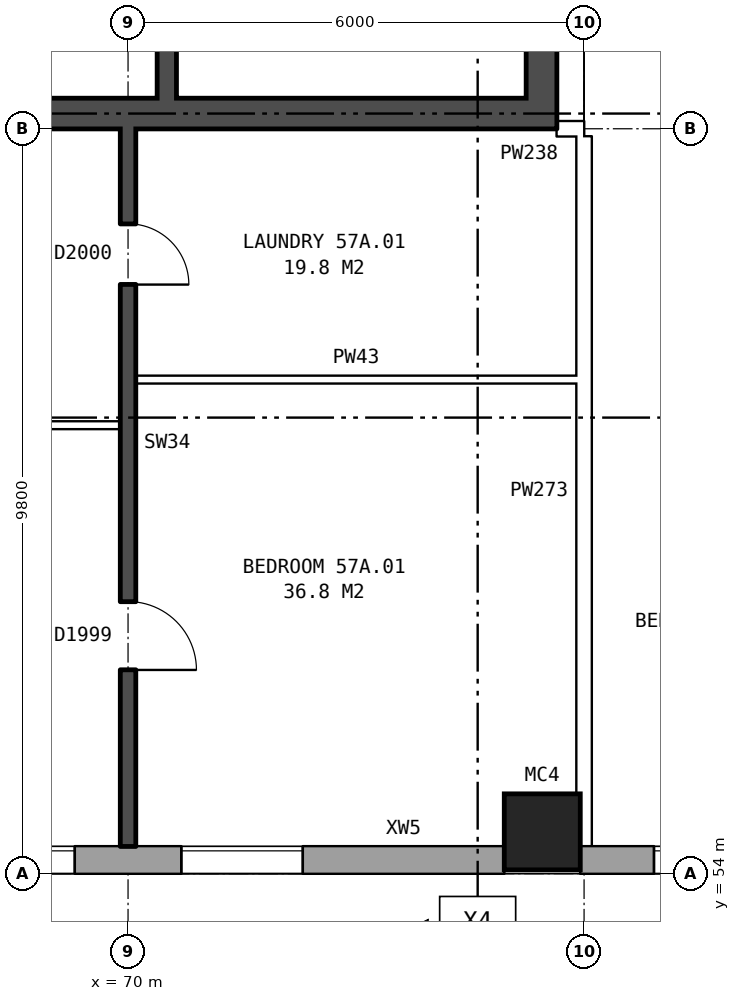
"""IFC4 building model, lengths in metres.
Left out: names, types, materials, properties, quantities, classifications, styles, units other than length and angle.
Written with IfcOpenShell. Run it as: python <this file> out.ifc"""

import sys

from ifc_helpers import new_model, si_unit, direction, frame, frame_2d, origin, origin_2d, place, context, subcontext, project, spatial, rectangle, hollow_rectangle, extrude, element, fill, save


model = new_model("IFC4")
c1 = context("Model", 3, precision=1e-05, world=origin(), true_north=direction((0.0, 1.0)))
c2 = subcontext(c1, "Body", "Model", "MODEL_VIEW")
j1 = project(units=[si_unit("LENGTHUNIT", "METRE"), si_unit("PLANEANGLEUNIT", "RADIAN")], contexts=[c1])
p1 = place(None, origin())
s1 = spatial("IfcSite", under=j1, at=p1, CompositionType="ELEMENT")
p2 = place(p1, origin())
s2 = spatial("IfcBuilding", under=s1, at=p2, CompositionType="ELEMENT")
p3 = place(p2, frame((0.0, 0.0, 202.8)))
s3 = spatial("IfcBuildingStorey", under=s2, at=p3, CompositionType="ELEMENT", Elevation=202.8)
p4 = place(p3, frame((75.45, 54.55, 0.0), z_axis=(0.0, 0.0, 1.0), x_axis=(1.0, 0.0, 0.0)))
e1 = element("IfcColumn", 1, at=p4, inside=s3, PredefinedType="COLUMN", context=c2, shape_type="SweptSolid", body=[
    extrude(hollow_rectangle(XDim=1.0, YDim=1.0, WallThickness=0.055, at=origin_2d()), origin(), (0.0, 0.0, 1.0), 3.1),
])
p5 = place(p3, frame((35.075, 54.18, 0.0), z_axis=(0.0, 0.0, 1.0), x_axis=(1.0, 0.0, 0.0)))
e2 = element("IfcWall", 2, at=p5, inside=s3, PredefinedType="STANDARD", context=c2, shape_type="SweptSolid", body=[
    extrude(rectangle(XDim=39.875, YDim=0.36, at=frame_2d((19.938, 0.0))), origin(), (0.0, 0.0, 1.0), 2.85),
])
p6 = place(p5, frame((2.625, 0.0, 0.8)))
e3 = element("IfcOpeningElement", 3, at=p6, cuts=e2, PredefinedType="OPENING", context=c2, shape_type="SweptSolid", body=[
    extrude(rectangle(XDim=1.6, YDim=1.8, at=frame_2d((0.8, 0.9))), frame((0.0, 0.19, 0.0), z_axis=(0.0, -1.0, 0.0), x_axis=(1.0, 0.0, 0.0)), (0.0, 0.0, 1.0), 0.38),
])
p7 = place(p5, frame((5.625, 0.0, 0.8)))
e4 = element("IfcOpeningElement", 4, at=p7, cuts=e2, PredefinedType="OPENING", context=c2, shape_type="SweptSolid", body=[
    extrude(rectangle(XDim=1.6, YDim=1.8, at=frame_2d((0.8, 0.9))), frame((0.0, 0.19, 0.0), z_axis=(0.0, -1.0, 0.0), x_axis=(1.0, 0.0, 0.0)), (0.0, 0.0, 1.0), 0.38),
])
p8 = place(p5, frame((8.625, 0.0, 0.8)))
e5 = element("IfcOpeningElement", 5, at=p8, cuts=e2, PredefinedType="OPENING", context=c2, shape_type="SweptSolid", body=[
    extrude(rectangle(XDim=1.6, YDim=1.8, at=frame_2d((0.8, 0.9))), frame((0.0, 0.19, 0.0), z_axis=(0.0, -1.0, 0.0), x_axis=(1.0, 0.0, 0.0)), (0.0, 0.0, 1.0), 0.38),
])
p9 = place(p5, frame((11.625, 0.0, 0.8)))
e6 = element("IfcOpeningElement", 6, at=p9, cuts=e2, PredefinedType="OPENING", context=c2, shape_type="SweptSolid", body=[
    extrude(rectangle(XDim=1.6, YDim=1.8, at=frame_2d((0.8, 0.9))), frame((0.0, 0.19, 0.0), z_axis=(0.0, -1.0, 0.0), x_axis=(1.0, 0.0, 0.0)), (0.0, 0.0, 1.0), 0.38),
])
p10 = place(p5, frame((14.625, 0.0, 0.8)))
e7 = element("IfcOpeningElement", 7, at=p10, cuts=e2, PredefinedType="OPENING", context=c2, shape_type="SweptSolid", body=[
    extrude(rectangle(XDim=1.6, YDim=1.8, at=frame_2d((0.8, 0.9))), frame((0.0, 0.19, 0.0), z_axis=(0.0, -1.0, 0.0), x_axis=(1.0, 0.0, 0.0)), (0.0, 0.0, 1.0), 0.38),
])
p11 = place(p5, frame((17.625, 0.0, 0.8)))
e8 = element("IfcOpeningElement", 8, at=p11, cuts=e2, PredefinedType="OPENING", context=c2, shape_type="SweptSolid", body=[
    extrude(rectangle(XDim=1.6, YDim=1.8, at=frame_2d((0.8, 0.9))), frame((0.0, 0.19, 0.0), z_axis=(0.0, -1.0, 0.0), x_axis=(1.0, 0.0, 0.0)), (0.0, 0.0, 1.0), 0.38),
])
p12 = place(p5, frame((20.625, 0.0, 0.8)))
e9 = element("IfcOpeningElement", 9, at=p12, cuts=e2, PredefinedType="OPENING", context=c2, shape_type="SweptSolid", body=[
    extrude(rectangle(XDim=1.6, YDim=1.8, at=frame_2d((0.8, 0.9))), frame((0.0, 0.19, 0.0), z_axis=(0.0, -1.0, 0.0), x_axis=(1.0, 0.0, 0.0)), (0.0, 0.0, 1.0), 0.38),
])
p13 = place(p5, frame((23.625, 0.0, 0.8)))
e10 = element("IfcOpeningElement", 10, at=p13, cuts=e2, PredefinedType="OPENING", context=c2, shape_type="SweptSolid", body=[
    extrude(rectangle(XDim=1.6, YDim=1.8, at=frame_2d((0.8, 0.9))), frame((0.0, 0.19, 0.0), z_axis=(0.0, -1.0, 0.0), x_axis=(1.0, 0.0, 0.0)), (0.0, 0.0, 1.0), 0.38),
])
p14 = place(p5, frame((26.625, 0.0, 0.8)))
e11 = element("IfcOpeningElement", 11, at=p14, cuts=e2, PredefinedType="OPENING", context=c2, shape_type="SweptSolid", body=[
    extrude(rectangle(XDim=1.6, YDim=1.8, at=frame_2d((0.8, 0.9))), frame((0.0, 0.19, 0.0), z_axis=(0.0, -1.0, 0.0), x_axis=(1.0, 0.0, 0.0)), (0.0, 0.0, 1.0), 0.38),
])
p15 = place(p5, frame((29.625, 0.0, 0.8)))
e12 = element("IfcOpeningElement", 12, at=p15, cuts=e2, PredefinedType="OPENING", context=c2, shape_type="SweptSolid", body=[
    extrude(rectangle(XDim=1.6, YDim=1.8, at=frame_2d((0.8, 0.9))), frame((0.0, 0.19, 0.0), z_axis=(0.0, -1.0, 0.0), x_axis=(1.0, 0.0, 0.0)), (0.0, 0.0, 1.0), 0.38),
])
p16 = place(p5, frame((32.625, 0.0, 0.8)))
e13 = element("IfcOpeningElement", 13, at=p16, cuts=e2, PredefinedType="OPENING", context=c2, shape_type="SweptSolid", body=[
    extrude(rectangle(XDim=1.6, YDim=1.8, at=frame_2d((0.8, 0.9))), frame((0.0, 0.19, 0.0), z_axis=(0.0, -1.0, 0.0), x_axis=(1.0, 0.0, 0.0)), (0.0, 0.0, 1.0), 0.38),
])
p17 = place(p5, frame((35.625, 0.0, 0.8)))
e14 = element("IfcOpeningElement", 14, at=p17, cuts=e2, PredefinedType="OPENING", context=c2, shape_type="SweptSolid", body=[
    extrude(rectangle(XDim=1.6, YDim=1.8, at=frame_2d((0.8, 0.9))), frame((0.0, 0.19, 0.0), z_axis=(0.0, -1.0, 0.0), x_axis=(1.0, 0.0, 0.0)), (0.0, 0.0, 1.0), 0.38),
])
p18 = place(p3, frame((75.95, 54.18, 0.0), z_axis=(0.0, 0.0, 1.0), x_axis=(1.0, 0.0, 0.0)))
e15 = element("IfcWall", 15, at=p18, inside=s3, PredefinedType="STANDARD", context=c2, shape_type="SweptSolid", body=[
    extrude(rectangle(XDim=55.1, YDim=0.36, at=frame_2d((27.55, 0.0))), origin(), (0.0, 0.0, 1.0), 2.85),
])
p19 = place(p18, frame((0.969, 0.0, 0.8)))
e16 = element("IfcOpeningElement", 16, at=p19, cuts=e15, PredefinedType="OPENING", context=c2, shape_type="SweptSolid", body=[
    extrude(rectangle(XDim=1.6, YDim=1.8, at=frame_2d((0.8, 0.9))), frame((0.0, 0.19, 0.0), z_axis=(0.0, -1.0, 0.0), x_axis=(1.0, 0.0, 0.0)), (0.0, 0.0, 1.0), 0.38),
])
p20 = place(p18, frame((4.406, 0.0, 0.8)))
e17 = element("IfcOpeningElement", 17, at=p20, cuts=e15, PredefinedType="OPENING", context=c2, shape_type="SweptSolid", body=[
    extrude(rectangle(XDim=1.6, YDim=1.8, at=frame_2d((0.8, 0.9))), frame((0.0, 0.19, 0.0), z_axis=(0.0, -1.0, 0.0), x_axis=(1.0, 0.0, 0.0)), (0.0, 0.0, 1.0), 0.38),
])
p21 = place(p18, frame((7.844, 0.0, 0.8)))
e18 = element("IfcOpeningElement", 18, at=p21, cuts=e15, PredefinedType="OPENING", context=c2, shape_type="SweptSolid", body=[
    extrude(rectangle(XDim=1.6, YDim=1.8, at=frame_2d((0.8, 0.9))), frame((0.0, 0.19, 0.0), z_axis=(0.0, -1.0, 0.0), x_axis=(1.0, 0.0, 0.0)), (0.0, 0.0, 1.0), 0.38),
])
p22 = place(p18, frame((11.281, 0.0, 0.8)))
e19 = element("IfcOpeningElement", 19, at=p22, cuts=e15, PredefinedType="OPENING", context=c2, shape_type="SweptSolid", body=[
    extrude(rectangle(XDim=1.6, YDim=1.8, at=frame_2d((0.8, 0.9))), frame((0.0, 0.19, 0.0), z_axis=(0.0, -1.0, 0.0), x_axis=(1.0, 0.0, 0.0)), (0.0, 0.0, 1.0), 0.38),
])
p23 = place(p18, frame((14.719, 0.0, 0.8)))
e20 = element("IfcOpeningElement", 20, at=p23, cuts=e15, PredefinedType="OPENING", context=c2, shape_type="SweptSolid", body=[
    extrude(rectangle(XDim=1.6, YDim=1.8, at=frame_2d((0.8, 0.9))), frame((0.0, 0.19, 0.0), z_axis=(0.0, -1.0, 0.0), x_axis=(1.0, 0.0, 0.0)), (0.0, 0.0, 1.0), 0.38),
])
p24 = place(p18, frame((18.156, 0.0, 0.8)))
e21 = element("IfcOpeningElement", 21, at=p24, cuts=e15, PredefinedType="OPENING", context=c2, shape_type="SweptSolid", body=[
    extrude(rectangle(XDim=1.6, YDim=1.8, at=frame_2d((0.8, 0.9))), frame((0.0, 0.19, 0.0), z_axis=(0.0, -1.0, 0.0), x_axis=(1.0, 0.0, 0.0)), (0.0, 0.0, 1.0), 0.38),
])
p25 = place(p18, frame((21.594, 0.0, 0.8)))
e22 = element("IfcOpeningElement", 22, at=p25, cuts=e15, PredefinedType="OPENING", context=c2, shape_type="SweptSolid", body=[
    extrude(rectangle(XDim=1.6, YDim=1.8, at=frame_2d((0.8, 0.9))), frame((0.0, 0.19, 0.0), z_axis=(0.0, -1.0, 0.0), x_axis=(1.0, 0.0, 0.0)), (0.0, 0.0, 1.0), 0.38),
])
p26 = place(p18, frame((25.031, 0.0, 0.8)))
e23 = element("IfcOpeningElement", 23, at=p26, cuts=e15, PredefinedType="OPENING", context=c2, shape_type="SweptSolid", body=[
    extrude(rectangle(XDim=1.6, YDim=1.8, at=frame_2d((0.8, 0.9))), frame((0.0, 0.19, 0.0), z_axis=(0.0, -1.0, 0.0), x_axis=(1.0, 0.0, 0.0)), (0.0, 0.0, 1.0), 0.38),
])
p27 = place(p18, frame((28.469, 0.0, 0.8)))
e24 = element("IfcOpeningElement", 24, at=p27, cuts=e15, PredefinedType="OPENING", context=c2, shape_type="SweptSolid", body=[
    extrude(rectangle(XDim=1.6, YDim=1.8, at=frame_2d((0.8, 0.9))), frame((0.0, 0.19, 0.0), z_axis=(0.0, -1.0, 0.0), x_axis=(1.0, 0.0, 0.0)), (0.0, 0.0, 1.0), 0.38),
])
p28 = place(p18, frame((31.906, 0.0, 0.8)))
e25 = element("IfcOpeningElement", 25, at=p28, cuts=e15, PredefinedType="OPENING", context=c2, shape_type="SweptSolid", body=[
    extrude(rectangle(XDim=1.6, YDim=1.8, at=frame_2d((0.8, 0.9))), frame((0.0, 0.19, 0.0), z_axis=(0.0, -1.0, 0.0), x_axis=(1.0, 0.0, 0.0)), (0.0, 0.0, 1.0), 0.38),
])
p29 = place(p18, frame((35.344, 0.0, 0.8)))
e26 = element("IfcOpeningElement", 26, at=p29, cuts=e15, PredefinedType="OPENING", context=c2, shape_type="SweptSolid", body=[
    extrude(rectangle(XDim=1.6, YDim=1.8, at=frame_2d((0.8, 0.9))), frame((0.0, 0.19, 0.0), z_axis=(0.0, -1.0, 0.0), x_axis=(1.0, 0.0, 0.0)), (0.0, 0.0, 1.0), 0.38),
])
p30 = place(p18, frame((38.781, 0.0, 0.8)))
e27 = element("IfcOpeningElement", 27, at=p30, cuts=e15, PredefinedType="OPENING", context=c2, shape_type="SweptSolid", body=[
    extrude(rectangle(XDim=1.6, YDim=1.8, at=frame_2d((0.8, 0.9))), frame((0.0, 0.19, 0.0), z_axis=(0.0, -1.0, 0.0), x_axis=(1.0, 0.0, 0.0)), (0.0, 0.0, 1.0), 0.38),
])
p31 = place(p18, frame((42.219, 0.0, 0.8)))
e28 = element("IfcOpeningElement", 28, at=p31, cuts=e15, PredefinedType="OPENING", context=c2, shape_type="SweptSolid", body=[
    extrude(rectangle(XDim=1.6, YDim=1.8, at=frame_2d((0.8, 0.9))), frame((0.0, 0.19, 0.0), z_axis=(0.0, -1.0, 0.0), x_axis=(1.0, 0.0, 0.0)), (0.0, 0.0, 1.0), 0.38),
])
p32 = place(p18, frame((45.656, 0.0, 0.8)))
e29 = element("IfcOpeningElement", 29, at=p32, cuts=e15, PredefinedType="OPENING", context=c2, shape_type="SweptSolid", body=[
    extrude(rectangle(XDim=1.6, YDim=1.8, at=frame_2d((0.8, 0.9))), frame((0.0, 0.19, 0.0), z_axis=(0.0, -1.0, 0.0), x_axis=(1.0, 0.0, 0.0)), (0.0, 0.0, 1.0), 0.38),
])
p33 = place(p18, frame((49.094, 0.0, 0.8)))
e30 = element("IfcOpeningElement", 30, at=p33, cuts=e15, PredefinedType="OPENING", context=c2, shape_type="SweptSolid", body=[
    extrude(rectangle(XDim=1.6, YDim=1.8, at=frame_2d((0.8, 0.9))), frame((0.0, 0.19, 0.0), z_axis=(0.0, -1.0, 0.0), x_axis=(1.0, 0.0, 0.0)), (0.0, 0.0, 1.0), 0.38),
])
p34 = place(p18, frame((52.531, 0.0, 0.8)))
e31 = element("IfcOpeningElement", 31, at=p34, cuts=e15, PredefinedType="OPENING", context=c2, shape_type="SweptSolid", body=[
    extrude(rectangle(XDim=1.6, YDim=1.8, at=frame_2d((0.8, 0.9))), frame((0.0, 0.19, 0.0), z_axis=(0.0, -1.0, 0.0), x_axis=(1.0, 0.0, 0.0)), (0.0, 0.0, 1.0), 0.38),
])
p35 = place(p3, frame((75.44, 63.8, 0.0), z_axis=(0.0, 0.0, 1.0), x_axis=(0.0, 1.0, 0.0)))
e32 = element("IfcWall", 32, at=p35, inside=s3, PredefinedType="SHEAR", context=c2, shape_type="SweptSolid", body=[
    extrude(rectangle(XDim=12.4, YDim=0.4, at=frame_2d((6.2, 0.0))), origin(), (0.0, 0.0, 1.0), 2.85),
])
p36 = place(p35, frame((9.8, 0.0, 0.0)))
e33 = element("IfcOpeningElement", 33, at=p36, cuts=e32, PredefinedType="OPENING", context=c2, shape_type="SweptSolid", body=[
    extrude(rectangle(XDim=1.1, YDim=2.1, at=frame_2d((0.55, 1.05))), frame((0.0, 0.21, 0.0), z_axis=(0.0, -1.0, 0.0), x_axis=(1.0, 0.0, 0.0)), (0.0, 0.0, 1.0), 0.42),
])
p37 = place(p3, frame((67.04, 64.0, 0.0), z_axis=(0.0, 0.0, 1.0), x_axis=(1.0, 0.0, 0.0)))
e34 = element("IfcWall", 34, at=p37, inside=s3, PredefinedType="SHEAR", context=c2, shape_type="SweptSolid", body=[
    extrude(rectangle(XDim=8.2, YDim=0.4, at=frame_2d((4.1, 0.0))), origin(), (0.0, 0.0, 1.0), 2.85),
])
p38 = place(p3, frame((70.51, 64.2, 0.0), z_axis=(0.0, 0.0, 1.0), x_axis=(0.0, 1.0, 0.0)))
e35 = element("IfcWall", 35, at=p38, inside=s3, PredefinedType="SHEAR", context=c2, shape_type="SweptSolid", body=[
    extrude(rectangle(XDim=2.525, YDim=0.25, at=frame_2d((1.263, 0.0))), origin(), (0.0, 0.0, 1.0), 2.85),
])
p39 = place(p3, frame((64.1, 59.9, 0.0), z_axis=(0.0, 0.0, 1.0), x_axis=(1.0, 0.0, 0.0)))
e36 = element("IfcWall", 36, at=p39, inside=s3, PredefinedType="PARTITIONING", context=c2, shape_type="SweptSolid", body=[
    extrude(rectangle(XDim=5.8, YDim=0.1, at=frame_2d((2.9, 0.0))), origin(), (0.0, 0.0, 1.0), 2.85),
])
p40 = place(p39, frame((3.6, 0.0, 0.0)))
e37 = element("IfcOpeningElement", 37, at=p40, cuts=e36, PredefinedType="OPENING", context=c2, shape_type="SweptSolid", body=[
    extrude(rectangle(XDim=0.9, YDim=2.1, at=frame_2d((0.45, 1.05))), frame((0.0, 0.06, 0.0), z_axis=(0.0, -1.0, 0.0), x_axis=(1.0, 0.0, 0.0)), (0.0, 0.0, 1.0), 0.12),
])
p41 = place(p39, frame((0.7, 0.0, 0.0)))
e38 = element("IfcOpeningElement", 38, at=p41, cuts=e36, PredefinedType="OPENING", context=c2, shape_type="SweptSolid", body=[
    extrude(rectangle(XDim=0.9, YDim=2.1, at=frame_2d((0.45, 1.05))), frame((0.0, 0.06, 0.0), z_axis=(0.0, -1.0, 0.0), x_axis=(1.0, 0.0, 0.0)), (0.0, 0.0, 1.0), 0.12),
])
p42 = place(p3, frame((70.1, 60.5, 0.0), z_axis=(0.0, 0.0, 1.0), x_axis=(1.0, 0.0, 0.0)))
e39 = element("IfcWall", 39, at=p42, inside=s3, PredefinedType="PARTITIONING", context=c2, shape_type="SweptSolid", body=[
    extrude(rectangle(XDim=5.8, YDim=0.1, at=frame_2d((2.9, 0.0))), origin(), (0.0, 0.0, 1.0), 2.85),
])
p43 = place(p3, frame((75.64, 63.8, 0.0), z_axis=(0.0, 0.0, 1.0), x_axis=(1.0, 0.0, 0.0)))
e40 = element("IfcWall", 40, at=p43, inside=s3, PredefinedType="PARTITIONING", context=c2, shape_type="SweptSolid", body=[
    extrude(rectangle(XDim=0.36, YDim=0.2, at=frame_2d((0.18, 0.0))), origin(), (0.0, 0.0, 1.0), 2.85),
])
p44 = place(p3, frame((70.0, 54.36, 0.0), z_axis=(0.0, 0.0, 1.0), x_axis=(0.0, 1.0, 0.0)))
e41 = element("IfcWall", 41, at=p44, inside=s3, PredefinedType="SOLIDWALL", context=c2, shape_type="SweptSolid", body=[
    extrude(rectangle(XDim=9.44, YDim=0.2, at=frame_2d((4.72, 0.0))), origin(), (0.0, 0.0, 1.0), 2.85),
])
p45 = place(p44, frame((2.32, 0.0, 0.0)))
e42 = element("IfcOpeningElement", 42, at=p45, cuts=e41, PredefinedType="OPENING", context=c2, shape_type="SweptSolid", body=[
    extrude(rectangle(XDim=0.9, YDim=2.1, at=frame_2d((0.45, 1.05))), frame((0.0, 0.11, 0.0), z_axis=(0.0, -1.0, 0.0), x_axis=(1.0, 0.0, 0.0)), (0.0, 0.0, 1.0), 0.22),
])
p46 = place(p44, frame((7.39, 0.0, 0.0)))
e43 = element("IfcOpeningElement", 43, at=p46, cuts=e41, PredefinedType="OPENING", context=c2, shape_type="SweptSolid", body=[
    extrude(rectangle(XDim=0.8, YDim=2.1, at=frame_2d((0.4, 1.05))), frame((0.0, 0.11, 0.0), z_axis=(0.0, -1.0, 0.0), x_axis=(1.0, 0.0, 0.0)), (0.0, 0.0, 1.0), 0.22),
])
p47 = place(p3, frame((76.0, 54.36, 0.0), z_axis=(0.0, 0.0, 1.0), x_axis=(0.0, 1.0, 0.0)))
e44 = element("IfcWall", 44, at=p47, inside=s3, PredefinedType="PARTITIONING", context=c2, shape_type="SweptSolid", body=[
    extrude(rectangle(XDim=9.34, YDim=0.2, at=frame_2d((4.67, 0.0))), origin(), (0.0, 0.0, 1.0), 2.85),
])
p48 = place(p16, origin())
e45 = element("IfcWindow", 45, at=p48, inside=s3, PartitioningType="SINGLE_PANEL", PredefinedType="WINDOW", context=c2, shape_type="SweptSolid", body=[
    extrude(rectangle(XDim=1.6, YDim=1.8, at=frame_2d((0.8, 0.9))), frame((0.0, 0.15, 0.0), z_axis=(0.0, -1.0, 0.0), x_axis=(1.0, 0.0, 0.0)), (0.0, 0.0, 1.0), 0.06),
])
fill(e13, e45)
p49 = place(p17, origin())
e46 = element("IfcWindow", 46, at=p49, inside=s3, PartitioningType="SINGLE_PANEL", PredefinedType="WINDOW", context=c2, shape_type="SweptSolid", body=[
    extrude(rectangle(XDim=1.6, YDim=1.8, at=frame_2d((0.8, 0.9))), frame((0.0, 0.15, 0.0), z_axis=(0.0, -1.0, 0.0), x_axis=(1.0, 0.0, 0.0)), (0.0, 0.0, 1.0), 0.06),
])
fill(e14, e46)
p50 = place(p19, origin())
e47 = element("IfcWindow", 47, at=p50, inside=s3, PartitioningType="SINGLE_PANEL", PredefinedType="WINDOW", context=c2, shape_type="SweptSolid", body=[
    extrude(rectangle(XDim=1.6, YDim=1.8, at=frame_2d((0.8, 0.9))), frame((0.0, 0.15, 0.0), z_axis=(0.0, -1.0, 0.0), x_axis=(1.0, 0.0, 0.0)), (0.0, 0.0, 1.0), 0.06),
])
fill(e16, e47)
p51 = place(p45, frame((0.9, 0.0, 0.0), z_axis=(0.0, 0.0, 1.0), x_axis=(-1.0, 0.0, 0.0)))
e48 = element("IfcDoor", 48, at=p51, inside=s3, OperationType="SINGLE_SWING_RIGHT", PredefinedType="DOOR", context=c2, shape_type="SweptSolid", body=[
    extrude(rectangle(XDim=0.9, YDim=2.1, at=frame_2d((0.45, 1.05))), frame((0.0, 0.025, 0.0), z_axis=(0.0, -1.0, 0.0), x_axis=(1.0, 0.0, 0.0)), (0.0, 0.0, 1.0), 0.05),
])
fill(e42, e48)
p52 = place(p46, frame((0.8, 0.0, 0.0), z_axis=(0.0, 0.0, 1.0), x_axis=(-1.0, 0.0, 0.0)))
e49 = element("IfcDoor", 49, at=p52, inside=s3, OperationType="SINGLE_SWING_RIGHT", PredefinedType="DOOR", context=c2, shape_type="SweptSolid", body=[
    extrude(rectangle(XDim=0.8, YDim=2.1, at=frame_2d((0.4, 1.05))), frame((0.0, 0.025, 0.0), z_axis=(0.0, -1.0, 0.0), x_axis=(1.0, 0.0, 0.0)), (0.0, 0.0, 1.0), 0.05),
])
fill(e43, e49)
save(model, sys.argv[1])
